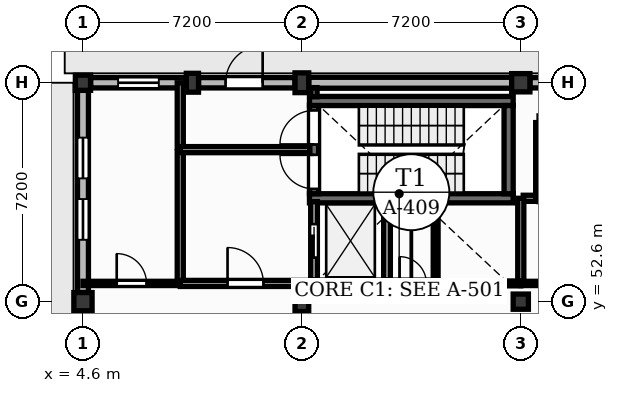
"""IFC4 building model, lengths in metres.
Left out: names, types, materials, properties, quantities, classifications, styles, units other than length and angle.
Written with IfcOpenShell. Run it as: python <this file> out.ifc"""

import sys

from ifc_helpers import new_model, si_unit, direction, frame, frame_2d, origin, origin_2d, place, context, subcontext, project, spatial, rectangle, extrude, element, fill, save


model = new_model("IFC4")
c1 = context("Model", 3, precision=1e-05, world=origin(), true_north=direction((0.0, 1.0)))
c2 = subcontext(c1, "Body", "Model", "MODEL_VIEW")
j1 = project(units=[si_unit("LENGTHUNIT", "METRE"), si_unit("PLANEANGLEUNIT", "RADIAN")], contexts=[c1])
p1 = place(None, origin())
s1 = spatial("IfcSite", under=j1, at=p1, CompositionType="ELEMENT")
p2 = place(p1, origin())
s2 = spatial("IfcBuilding", under=s1, at=p2, CompositionType="ELEMENT")
p3 = place(p2, origin())
s3 = spatial("IfcBuildingStorey", under=s2, at=p3, CompositionType="ELEMENT", Elevation=0.0)
p4 = place(p3, frame((4.6, 52.6, 0.0), z_axis=(0.0, 0.0, 1.0), x_axis=(1.0, 0.0, 0.0)))
e1 = element("IfcColumn", 1, at=p4, inside=s3, PredefinedType="COLUMN", context=c2, shape_type="SweptSolid", body=[
    extrude(rectangle(XDim=0.6, YDim=0.6, at=origin_2d()), origin(), (0.0, 0.0, 1.0), 4.2),
])
p5 = place(p3, frame((4.6, 59.8, 0.0), z_axis=(0.0, 0.0, 1.0), x_axis=(1.0, 0.0, 0.0)))
e2 = element("IfcColumn", 2, at=p5, inside=s3, PredefinedType="COLUMN", context=c2, shape_type="SweptSolid", body=[
    extrude(rectangle(XDim=0.5, YDim=0.5, at=origin_2d()), origin(), (0.0, 0.0, 1.0), 4.2),
])
for number, where, z_axis, x_axis in (
    (3, (11.8, 52.6, 0.0), (0.0, 0.0, 1.0), (1.0, 0.0, 0.0)),
    (4, (11.8, 59.8, 0.0), (0.0, 0.0, 1.0), (1.0, 0.0, 0.0)),
):
    element("IfcColumn", number, at=place(p3, frame(where, z_axis=z_axis, x_axis=x_axis)), inside=s3, PredefinedType="COLUMN", context=c2, shape_type="SweptSolid", body=[
        extrude(rectangle(XDim=0.45, YDim=0.65, at=origin_2d()), origin(), (0.0, 0.0, 1.0), 4.2),
    ])
p6 = place(p3, frame((19.0, 52.6, 0.0), z_axis=(0.0, 0.0, 1.0), x_axis=(1.0, 0.0, 0.0)))
e5 = element("IfcColumn", 5, at=p6, inside=s3, PredefinedType="COLUMN", context=c2, shape_type="SweptSolid", body=[
    extrude(rectangle(XDim=0.5, YDim=0.5, at=origin_2d()), origin(), (0.0, 0.0, 1.0), 4.2),
])
p7 = place(p3, frame((19.0, 59.8, 0.0), z_axis=(0.0, 0.0, 1.0), x_axis=(1.0, 0.0, 0.0)))
e6 = element("IfcColumn", 6, at=p7, inside=s3, PredefinedType="COLUMN", context=c2, shape_type="SweptSolid", body=[
    extrude(rectangle(XDim=0.6, YDim=0.6, at=origin_2d()), origin(), (0.0, 0.0, 1.0), 4.2),
])
p8 = place(p3, frame((8.2, 59.8, 0.0), z_axis=(0.0, 0.0, 1.0), x_axis=(1.0, 0.0, 0.0)))
e7 = element("IfcColumn", 7, at=p8, inside=s3, PredefinedType="PILASTER", context=c2, shape_type="SweptSolid", body=[
    extrude(rectangle(XDim=0.4, YDim=0.62, at=origin_2d()), origin(), (0.0, 0.0, 1.0), 4.2),
])
p9 = place(p3, frame((4.6, 45.65, 0.0), z_axis=(0.0, 0.0, 1.0), x_axis=(0.0, 1.0, 0.0)))
e8 = element("IfcWall", 8, at=p9, inside=s3, PredefinedType="SOLIDWALL", context=c2, shape_type="SweptSolid", body=[
    extrude(rectangle(XDim=6.65, YDim=0.34, at=frame_2d((3.325, 0.0))), origin(), (0.0, 0.0, 1.0), 3.68),
])
p10 = place(p9, frame((1.995, 0.0, 1.0)))
e9 = element("IfcOpeningElement", 9, at=p10, cuts=e8, PredefinedType="OPENING", context=c2, shape_type="SweptSolid", body=[
    extrude(rectangle(XDim=1.08, YDim=1.95, at=frame_2d((0.54, 0.975))), frame((0.0, 0.18, 0.0), z_axis=(0.0, -1.0, 0.0), x_axis=(1.0, 0.0, 0.0)), (0.0, 0.0, 1.0), 0.36),
])
p11 = place(p3, frame((4.85, 59.8, 0.0), z_axis=(0.0, 0.0, 1.0), x_axis=(1.0, 0.0, 0.0)))
e10 = element("IfcWall", 10, at=p11, inside=s3, PredefinedType="SOLIDWALL", context=c2, shape_type="SweptSolid", body=[
    extrude(rectangle(XDim=3.15, YDim=0.34, at=frame_2d((1.575, 0.0))), origin(), (0.0, 0.0, 1.0), 3.68),
])
p12 = place(p11, frame((0.905, 0.0, 1.0)))
e11 = element("IfcOpeningElement", 11, at=p12, cuts=e10, PredefinedType="OPENING", context=c2, shape_type="SweptSolid", body=[
    extrude(rectangle(XDim=1.34, YDim=1.95, at=frame_2d((0.67, 0.975))), frame((0.0, 0.18, 0.0), z_axis=(0.0, -1.0, 0.0), x_axis=(1.0, 0.0, 0.0)), (0.0, 0.0, 1.0), 0.36),
])
p13 = place(p3, frame((8.4, 59.8, 0.0), z_axis=(0.0, 0.0, 1.0), x_axis=(1.0, 0.0, 0.0)))
e12 = element("IfcWall", 12, at=p13, inside=s3, PredefinedType="SOLIDWALL", context=c2, shape_type="SweptSolid", body=[
    extrude(rectangle(XDim=3.175, YDim=0.34, at=frame_2d((1.587, 0.0))), origin(), (0.0, 0.0, 1.0), 3.68),
])
p14 = place(p13, frame((0.89, 0.0, 0.0)))
e13 = element("IfcOpeningElement", 13, at=p14, cuts=e12, PredefinedType="OPENING", context=c2, shape_type="SweptSolid", body=[
    extrude(rectangle(XDim=1.22, YDim=2.2, at=frame_2d((0.61, 1.1))), frame((0.0, 0.18, 0.0), z_axis=(0.0, -1.0, 0.0), x_axis=(1.0, 0.0, 0.0)), (0.0, 0.0, 1.0), 0.36),
])
p15 = place(p3, frame((4.6, 52.9, 0.0), z_axis=(0.0, 0.0, 1.0), x_axis=(0.0, 1.0, 0.0)))
e14 = element("IfcWall", 14, at=p15, inside=s3, PredefinedType="SOLIDWALL", context=c2, shape_type="SweptSolid", body=[
    extrude(rectangle(XDim=6.65, YDim=0.36, at=frame_2d((3.325, 0.0))), origin(), (0.0, 0.0, 1.0), 3.68),
])
p16 = place(p15, frame((1.735, 0.0, 1.0)))
e15 = element("IfcOpeningElement", 15, at=p16, cuts=e14, PredefinedType="OPENING", context=c2, shape_type="SweptSolid", body=[
    extrude(rectangle(XDim=1.34, YDim=1.95, at=frame_2d((0.67, 0.975))), frame((0.0, 0.19, 0.0), z_axis=(0.0, -1.0, 0.0), x_axis=(1.0, 0.0, 0.0)), (0.0, 0.0, 1.0), 0.38),
])
p17 = place(p15, frame((3.755, 0.0, 1.0)))
e16 = element("IfcOpeningElement", 16, at=p17, cuts=e14, PredefinedType="OPENING", context=c2, shape_type="SweptSolid", body=[
    extrude(rectangle(XDim=1.34, YDim=1.95, at=frame_2d((0.67, 0.975))), frame((0.0, 0.19, 0.0), z_axis=(0.0, -1.0, 0.0), x_axis=(1.0, 0.0, 0.0)), (0.0, 0.0, 1.0), 0.38),
])
p18 = place(p3, frame((12.025, 59.8, 0.0), z_axis=(0.0, 0.0, 1.0), x_axis=(1.0, 0.0, 0.0)))
e17 = element("IfcWall", 17, at=p18, inside=s3, PredefinedType="SOLIDWALL", context=c2, shape_type="SweptSolid", body=[
    extrude(rectangle(XDim=6.675, YDim=0.36, at=frame_2d((3.337, 0.0))), origin(), (0.0, 0.0, 1.0), 3.68),
])
p19 = place(p3, frame((19.3, 59.8, 0.0), z_axis=(0.0, 0.0, 1.0), x_axis=(1.0, 0.0, 0.0)))
e18 = element("IfcWall", 18, at=p19, inside=s3, PredefinedType="SOLIDWALL", context=c2, shape_type="SweptSolid", body=[
    extrude(rectangle(XDim=3.1, YDim=0.34, at=frame_2d((1.55, 0.0))), origin(), (0.0, 0.0, 1.0), 3.68),
])
p20 = place(p19, frame((0.77, 0.0, 1.0)))
e19 = element("IfcOpeningElement", 19, at=p20, cuts=e18, PredefinedType="OPENING", context=c2, shape_type="SweptSolid", body=[
    extrude(rectangle(XDim=1.08, YDim=1.95, at=frame_2d((0.54, 0.975))), frame((0.0, 0.18, 0.0), z_axis=(0.0, -1.0, 0.0), x_axis=(1.0, 0.0, 0.0)), (0.0, 0.0, 1.0), 0.36),
])
for number, where, z_axis, x_axis in (
    (20, (12.05, 56.0, 0.0), (0.0, 0.0, 1.0), (1.0, 0.0, 0.0)),
    (21, (12.05, 59.2, 0.0), (0.0, 0.0, 1.0), (1.0, 0.0, 0.0)),
):
    element("IfcWall", number, at=place(p3, frame(where, z_axis=z_axis, x_axis=x_axis)), inside=s3, PredefinedType="SHEAR", context=c2, shape_type="SweptSolid", body=[
        extrude(rectangle(XDim=6.7, YDim=0.3, at=frame_2d((3.35, 0.0))), origin(), (0.0, 0.0, 1.0), 4.25),
    ])
p21 = place(p3, frame((12.2, 56.15, 0.0), z_axis=(0.0, 0.0, 1.0), x_axis=(0.0, 1.0, 0.0)))
e22 = element("IfcWall", 22, at=p21, inside=s3, PredefinedType="SHEAR", context=c2, shape_type="SweptSolid", body=[
    extrude(rectangle(XDim=2.9, YDim=0.3, at=frame_2d((1.45, 0.0))), origin(), (0.0, 0.0, 1.0), 4.25),
])
p22 = place(p21, frame((1.62, 0.0, 0.0)))
e23 = element("IfcOpeningElement", 23, at=p22, cuts=e22, PredefinedType="OPENING", context=c2, shape_type="SweptSolid", body=[
    extrude(rectangle(XDim=1.12, YDim=2.1, at=frame_2d((0.56, 1.05))), frame((0.0, 0.16, 0.0), z_axis=(0.0, -1.0, 0.0), x_axis=(1.0, 0.0, 0.0)), (0.0, 0.0, 1.0), 0.32),
])
p23 = place(p21, frame((0.16, 0.0, 0.0)))
e24 = element("IfcOpeningElement", 24, at=p23, cuts=e22, PredefinedType="OPENING", context=c2, shape_type="SweptSolid", body=[
    extrude(rectangle(XDim=1.12, YDim=2.1, at=frame_2d((0.56, 1.05))), frame((0.0, 0.16, 0.0), z_axis=(0.0, -1.0, 0.0), x_axis=(1.0, 0.0, 0.0)), (0.0, 0.0, 1.0), 0.32),
])
p24 = place(p3, frame((18.6, 56.15, 0.0), z_axis=(0.0, 0.0, 1.0), x_axis=(0.0, 1.0, 0.0)))
e25 = element("IfcWall", 25, at=p24, inside=s3, PredefinedType="SHEAR", context=c2, shape_type="SweptSolid", body=[
    extrude(rectangle(XDim=2.9, YDim=0.3, at=frame_2d((1.45, 0.0))), origin(), (0.0, 0.0, 1.0), 4.25),
])
p25 = place(p3, frame((12.2, 53.2, 0.0), z_axis=(0.0, 0.0, 1.0), x_axis=(1.0, 0.0, 0.0)))
e26 = element("IfcWall", 26, at=p25, inside=s3, PredefinedType="SOLIDWALL", context=c2, shape_type="SweptSolid", body=[
    extrude(rectangle(XDim=2.4, YDim=0.22, at=frame_2d((1.2, 0.0))), origin(), (0.0, 0.0, 1.0), 4.25),
])
p26 = place(p3, frame((12.2, 53.31, 0.0), z_axis=(0.0, 0.0, 1.0), x_axis=(0.0, 1.0, 0.0)))
e27 = element("IfcWall", 27, at=p26, inside=s3, PredefinedType="SOLIDWALL", context=c2, shape_type="SweptSolid", body=[
    extrude(rectangle(XDim=2.58, YDim=0.22, at=frame_2d((1.29, 0.0))), origin(), (0.0, 0.0, 1.0), 4.25),
])
p27 = place(p26, frame((0.74, 0.0, 0.0)))
e28 = element("IfcOpeningElement", 28, at=p27, cuts=e27, PredefinedType="OPENING", context=c2, shape_type="SweptSolid", body=[
    extrude(rectangle(XDim=1.1, YDim=2.15, at=frame_2d((0.55, 1.075))), frame((0.0, 0.12, 0.0), z_axis=(0.0, -1.0, 0.0), x_axis=(1.0, 0.0, 0.0)), (0.0, 0.0, 1.0), 0.24),
])
p28 = place(p3, frame((14.6, 53.31, 0.0), z_axis=(0.0, 0.0, 1.0), x_axis=(0.0, 1.0, 0.0)))
e29 = element("IfcWall", 29, at=p28, inside=s3, PredefinedType="SOLIDWALL", context=c2, shape_type="SweptSolid", body=[
    extrude(rectangle(XDim=2.58, YDim=0.22, at=frame_2d((1.29, 0.0))), origin(), (0.0, 0.0, 1.0), 4.25),
])
p29 = place(p3, frame((19.6, 56.11, 0.0), z_axis=(0.0, 0.0, 1.0), x_axis=(0.0, 1.0, 0.0)))
e30 = element("IfcWall", 30, at=p29, inside=s3, PredefinedType="SOLIDWALL", context=c2, shape_type="SweptSolid", body=[
    extrude(rectangle(XDim=2.38, YDim=0.22, at=frame_2d((1.19, 0.0))), origin(), (0.0, 0.0, 1.0), 4.25),
])
p30 = place(p3, frame((4.6, 53.2, 0.0), z_axis=(0.0, 0.0, 1.0), x_axis=(1.0, 0.0, 0.0)))
e31 = element("IfcWall", 31, at=p30, inside=s3, PredefinedType="PARTITIONING", context=c2, shape_type="SweptSolid", body=[
    extrude(rectangle(XDim=3.2, YDim=0.14, at=frame_2d((1.6, 0.0))), origin(), (0.0, 0.0, 1.0), 4.18),
])
p31 = place(p30, frame((1.11, 0.0, 0.0)))
e32 = element("IfcOpeningElement", 32, at=p31, cuts=e31, PredefinedType="OPENING", context=c2, shape_type="SweptSolid", body=[
    extrude(rectangle(XDim=0.98, YDim=2.15, at=frame_2d((0.49, 1.075))), frame((0.0, 0.08, 0.0), z_axis=(0.0, -1.0, 0.0), x_axis=(1.0, 0.0, 0.0)), (0.0, 0.0, 1.0), 0.16),
])
p32 = place(p3, frame((7.8, 53.27, 0.0), z_axis=(0.0, 0.0, 1.0), x_axis=(0.0, 1.0, 0.0)))
e33 = element("IfcWall", 33, at=p32, inside=s3, PredefinedType="PARTITIONING", context=c2, shape_type="SweptSolid", body=[
    extrude(rectangle(XDim=4.26, YDim=0.2, at=frame_2d((2.13, 0.0))), origin(), (0.0, 0.0, 1.0), 4.18),
])
p33 = place(p3, frame((7.8, 53.2, 0.0), z_axis=(0.0, 0.0, 1.0), x_axis=(1.0, 0.0, 0.0)))
e34 = element("IfcWall", 34, at=p33, inside=s3, PredefinedType="PARTITIONING", context=c2, shape_type="SweptSolid", body=[
    extrude(rectangle(XDim=4.29, YDim=0.2, at=frame_2d((2.145, 0.0))), origin(), (0.0, 0.0, 1.0), 4.18),
])
p34 = place(p33, frame((1.555, 0.0, 0.0)))
e35 = element("IfcOpeningElement", 35, at=p34, cuts=e34, PredefinedType="OPENING", context=c2, shape_type="SweptSolid", body=[
    extrude(rectangle(XDim=1.18, YDim=2.15, at=frame_2d((0.59, 1.075))), frame((0.0, 0.11, 0.0), z_axis=(0.0, -1.0, 0.0), x_axis=(1.0, 0.0, 0.0)), (0.0, 0.0, 1.0), 0.22),
])
p35 = place(p3, frame((7.8, 57.67, 0.0), z_axis=(0.0, 0.0, 1.0), x_axis=(0.0, 1.0, 0.0)))
e36 = element("IfcWall", 36, at=p35, inside=s3, PredefinedType="PARTITIONING", context=c2, shape_type="SweptSolid", body=[
    extrude(rectangle(XDim=2.13, YDim=0.2, at=frame_2d((1.065, 0.0))), origin(), (0.0, 0.0, 1.0), 4.18),
])
p36 = place(p3, frame((7.8, 57.6, 0.0), z_axis=(0.0, 0.0, 1.0), x_axis=(1.0, 0.0, 0.0)))
e37 = element("IfcWall", 37, at=p36, inside=s3, PredefinedType="PARTITIONING", context=c2, shape_type="SweptSolid", body=[
    extrude(rectangle(XDim=4.26, YDim=0.2, at=frame_2d((2.13, 0.0))), origin(), (0.0, 0.0, 1.0), 4.18),
])
p37 = place(p3, frame((14.71, 53.2, 0.0), z_axis=(0.0, 0.0, 1.0), x_axis=(1.0, 0.0, 0.0)))
e38 = element("IfcWall", 38, at=p37, inside=s3, PredefinedType="SOLIDWALL", context=c2, shape_type="SweptSolid", body=[
    extrude(rectangle(XDim=1.49, YDim=0.22, at=frame_2d((0.745, 0.0))), origin(), (0.0, 0.0, 1.0), 4.18),
])
p38 = place(p37, frame((0.305, 0.0, 0.0)))
e39 = element("IfcOpeningElement", 39, at=p38, cuts=e38, PredefinedType="OPENING", context=c2, shape_type="SweptSolid", body=[
    extrude(rectangle(XDim=0.88, YDim=2.05, at=frame_2d((0.44, 1.025))), frame((0.0, 0.12, 0.0), z_axis=(0.0, -1.0, 0.0), x_axis=(1.0, 0.0, 0.0)), (0.0, 0.0, 1.0), 0.24),
])
p39 = place(p3, frame((19.0, 53.2, 0.0), z_axis=(0.0, 0.0, 1.0), x_axis=(1.0, 0.0, 0.0)))
e40 = element("IfcWall", 40, at=p39, inside=s3, PredefinedType="PARTITIONING", context=c2, shape_type="SweptSolid", body=[
    extrude(rectangle(XDim=5.4, YDim=0.14, at=frame_2d((2.7, 0.0))), origin(), (0.0, 0.0, 1.0), 4.18),
])
p40 = place(p39, frame((2.21, 0.0, 0.0)))
e41 = element("IfcOpeningElement", 41, at=p40, cuts=e40, PredefinedType="OPENING", context=c2, shape_type="SweptSolid", body=[
    extrude(rectangle(XDim=0.98, YDim=2.15, at=frame_2d((0.49, 1.075))), frame((0.0, 0.08, 0.0), z_axis=(0.0, -1.0, 0.0), x_axis=(1.0, 0.0, 0.0)), (0.0, 0.0, 1.0), 0.16),
])
p41 = place(p39, frame((3.46, 0.0, 0.0)))
e42 = element("IfcOpeningElement", 42, at=p41, cuts=e40, PredefinedType="OPENING", context=c2, shape_type="SweptSolid", body=[
    extrude(rectangle(XDim=1.12, YDim=2.15, at=frame_2d((0.56, 1.075))), frame((0.0, 0.08, 0.0), z_axis=(0.0, -1.0, 0.0), x_axis=(1.0, 0.0, 0.0)), (0.0, 0.0, 1.0), 0.16),
])
p42 = place(p3, frame((16.2, 53.27, 0.0), z_axis=(0.0, 0.0, 1.0), x_axis=(0.0, 1.0, 0.0)))
e43 = element("IfcWall", 43, at=p42, inside=s3, PredefinedType="PARTITIONING", context=c2, shape_type="SweptSolid", body=[
    extrude(rectangle(XDim=2.59, YDim=0.16, at=frame_2d((1.295, 0.0))), origin(), (0.0, 0.0, 1.0), 4.18),
])
p43 = place(p3, frame((12.2, 59.34, 0.0), z_axis=(0.0, 0.0, 1.0), x_axis=(0.0, 1.0, 0.0)))
e44 = element("IfcWall", 44, at=p43, inside=s3, PredefinedType="PARTITIONING", context=c2, shape_type="SweptSolid", body=[
    extrude(rectangle(XDim=0.3, YDim=0.2, at=frame_2d((0.15, 0.0))), origin(), (0.0, 0.0, 1.0), 4.18),
])
p44 = place(p3, frame((19.49, 56.0, 0.0), z_axis=(0.0, 0.0, 1.0), x_axis=(-1.0, 0.0, 0.0)))
e45 = element("IfcWall", 45, at=p44, inside=s3, PredefinedType="PARTITIONING", context=c2, shape_type="SweptSolid", body=[
    extrude(rectangle(XDim=0.41, YDim=0.2, at=frame_2d((0.205, 0.0))), origin(), (0.0, 0.0, 1.0), 4.18),
])
p45 = place(p3, frame((19.0, 53.27, 0.0), z_axis=(0.0, 0.0, 1.0), x_axis=(0.0, 1.0, 0.0)))
e46 = element("IfcWall", 46, at=p45, inside=s3, PredefinedType="PARTITIONING", context=c2, shape_type="SweptSolid", body=[
    extrude(rectangle(XDim=2.73, YDim=0.2, at=frame_2d((1.365, 0.0))), origin(), (0.0, 0.0, 1.0), 3.5),
])
p46 = place(p3, frame((19.0, 53.2, 0.0), z_axis=(0.0, 0.0, 1.0), x_axis=(-1.0, 0.0, 0.0)))
e47 = element("IfcWall", 47, at=p46, inside=s3, PredefinedType="PARTITIONING", context=c2, shape_type="SweptSolid", body=[
    extrude(rectangle(XDim=2.8, YDim=0.16, at=frame_2d((1.4, 0.0))), origin(), (0.0, 0.0, 1.0), 4.18),
])
p47 = place(p12, origin())
e48 = element("IfcWindow", 48, at=p47, inside=s3, PartitioningType="SINGLE_PANEL", PredefinedType="WINDOW", context=c2, shape_type="SweptSolid", body=[
    extrude(rectangle(XDim=1.34, YDim=1.95, at=frame_2d((0.67, 0.975))), frame((0.0, 0.03, 0.0), z_axis=(0.0, -1.0, 0.0), x_axis=(1.0, 0.0, 0.0)), (0.0, 0.0, 1.0), 0.06),
])
fill(e11, e48)
p48 = place(p14, origin())
e49 = element("IfcDoor", 49, at=p48, inside=s3, OperationType="SINGLE_SWING_RIGHT", PredefinedType="DOOR", context=c2, shape_type="SweptSolid", body=[
    extrude(rectangle(XDim=1.22, YDim=2.2, at=frame_2d((0.61, 1.1))), frame((0.0, 0.025, 0.0), z_axis=(0.0, -1.0, 0.0), x_axis=(1.0, 0.0, 0.0)), (0.0, 0.0, 1.0), 0.05),
])
fill(e13, e49)
p49 = place(p16, origin())
e50 = element("IfcWindow", 50, at=p49, inside=s3, PartitioningType="SINGLE_PANEL", PredefinedType="WINDOW", context=c2, shape_type="SweptSolid", body=[
    extrude(rectangle(XDim=1.34, YDim=1.95, at=frame_2d((0.67, 0.975))), frame((0.0, 0.03, 0.0), z_axis=(0.0, -1.0, 0.0), x_axis=(1.0, 0.0, 0.0)), (0.0, 0.0, 1.0), 0.06),
])
fill(e15, e50)
p50 = place(p17, origin())
e51 = element("IfcWindow", 51, at=p50, inside=s3, PartitioningType="SINGLE_PANEL", PredefinedType="WINDOW", context=c2, shape_type="SweptSolid", body=[
    extrude(rectangle(XDim=1.34, YDim=1.95, at=frame_2d((0.67, 0.975))), frame((0.0, 0.03, 0.0), z_axis=(0.0, -1.0, 0.0), x_axis=(1.0, 0.0, 0.0)), (0.0, 0.0, 1.0), 0.06),
])
fill(e16, e51)
p51 = place(p27, origin())
e52 = element("IfcDoor", 52, at=p51, inside=s3, OperationType="SLIDING_TO_LEFT", PredefinedType="DOOR", context=c2, shape_type="SweptSolid", body=[
    extrude(rectangle(XDim=1.1, YDim=2.15, at=frame_2d((0.55, 1.075))), frame((0.0, 0.025, 0.0), z_axis=(0.0, -1.0, 0.0), x_axis=(1.0, 0.0, 0.0)), (0.0, 0.0, 1.0), 0.05),
])
fill(e28, e52)
p52 = place(p22, origin())
e53 = element("IfcDoor", 53, at=p52, inside=s3, OperationType="SINGLE_SWING_LEFT", PredefinedType="DOOR", context=c2, shape_type="SweptSolid", body=[
    extrude(rectangle(XDim=1.12, YDim=2.1, at=frame_2d((0.56, 1.05))), frame((0.0, 0.025, 0.0), z_axis=(0.0, -1.0, 0.0), x_axis=(1.0, 0.0, 0.0)), (0.0, 0.0, 1.0), 0.05),
])
fill(e23, e53)
p53 = place(p23, origin())
e54 = element("IfcDoor", 54, at=p53, inside=s3, OperationType="SINGLE_SWING_RIGHT", PredefinedType="DOOR", context=c2, shape_type="SweptSolid", body=[
    extrude(rectangle(XDim=1.12, YDim=2.1, at=frame_2d((0.56, 1.05))), frame((0.0, 0.025, 0.0), z_axis=(0.0, -1.0, 0.0), x_axis=(1.0, 0.0, 0.0)), (0.0, 0.0, 1.0), 0.05),
])
fill(e24, e54)
p54 = place(p34, origin())
e55 = element("IfcDoor", 55, at=p54, inside=s3, OperationType="SINGLE_SWING_LEFT", PredefinedType="DOOR", context=c2, shape_type="SweptSolid", body=[
    extrude(rectangle(XDim=1.18, YDim=2.15, at=frame_2d((0.59, 1.075))), frame((0.0, 0.025, 0.0), z_axis=(0.0, -1.0, 0.0), x_axis=(1.0, 0.0, 0.0)), (0.0, 0.0, 1.0), 0.05),
])
fill(e35, e55)
p55 = place(p38, origin())
e56 = element("IfcDoor", 56, at=p55, inside=s3, OperationType="SINGLE_SWING_LEFT", PredefinedType="DOOR", context=c2, shape_type="SweptSolid", body=[
    extrude(rectangle(XDim=0.88, YDim=2.05, at=frame_2d((0.44, 1.025))), frame((0.0, 0.025, 0.0), z_axis=(0.0, -1.0, 0.0), x_axis=(1.0, 0.0, 0.0)), (0.0, 0.0, 1.0), 0.05),
])
fill(e39, e56)
p56 = place(p31, origin())
e57 = element("IfcDoor", 57, at=p56, inside=s3, OperationType="SINGLE_SWING_LEFT", PredefinedType="DOOR", context=c2, shape_type="SweptSolid", body=[
    extrude(rectangle(XDim=0.98, YDim=2.15, at=frame_2d((0.49, 1.075))), frame((0.0, 0.025, 0.0), z_axis=(0.0, -1.0, 0.0), x_axis=(1.0, 0.0, 0.0)), (0.0, 0.0, 1.0), 0.05),
])
fill(e32, e57)
save(model, sys.argv[1])
